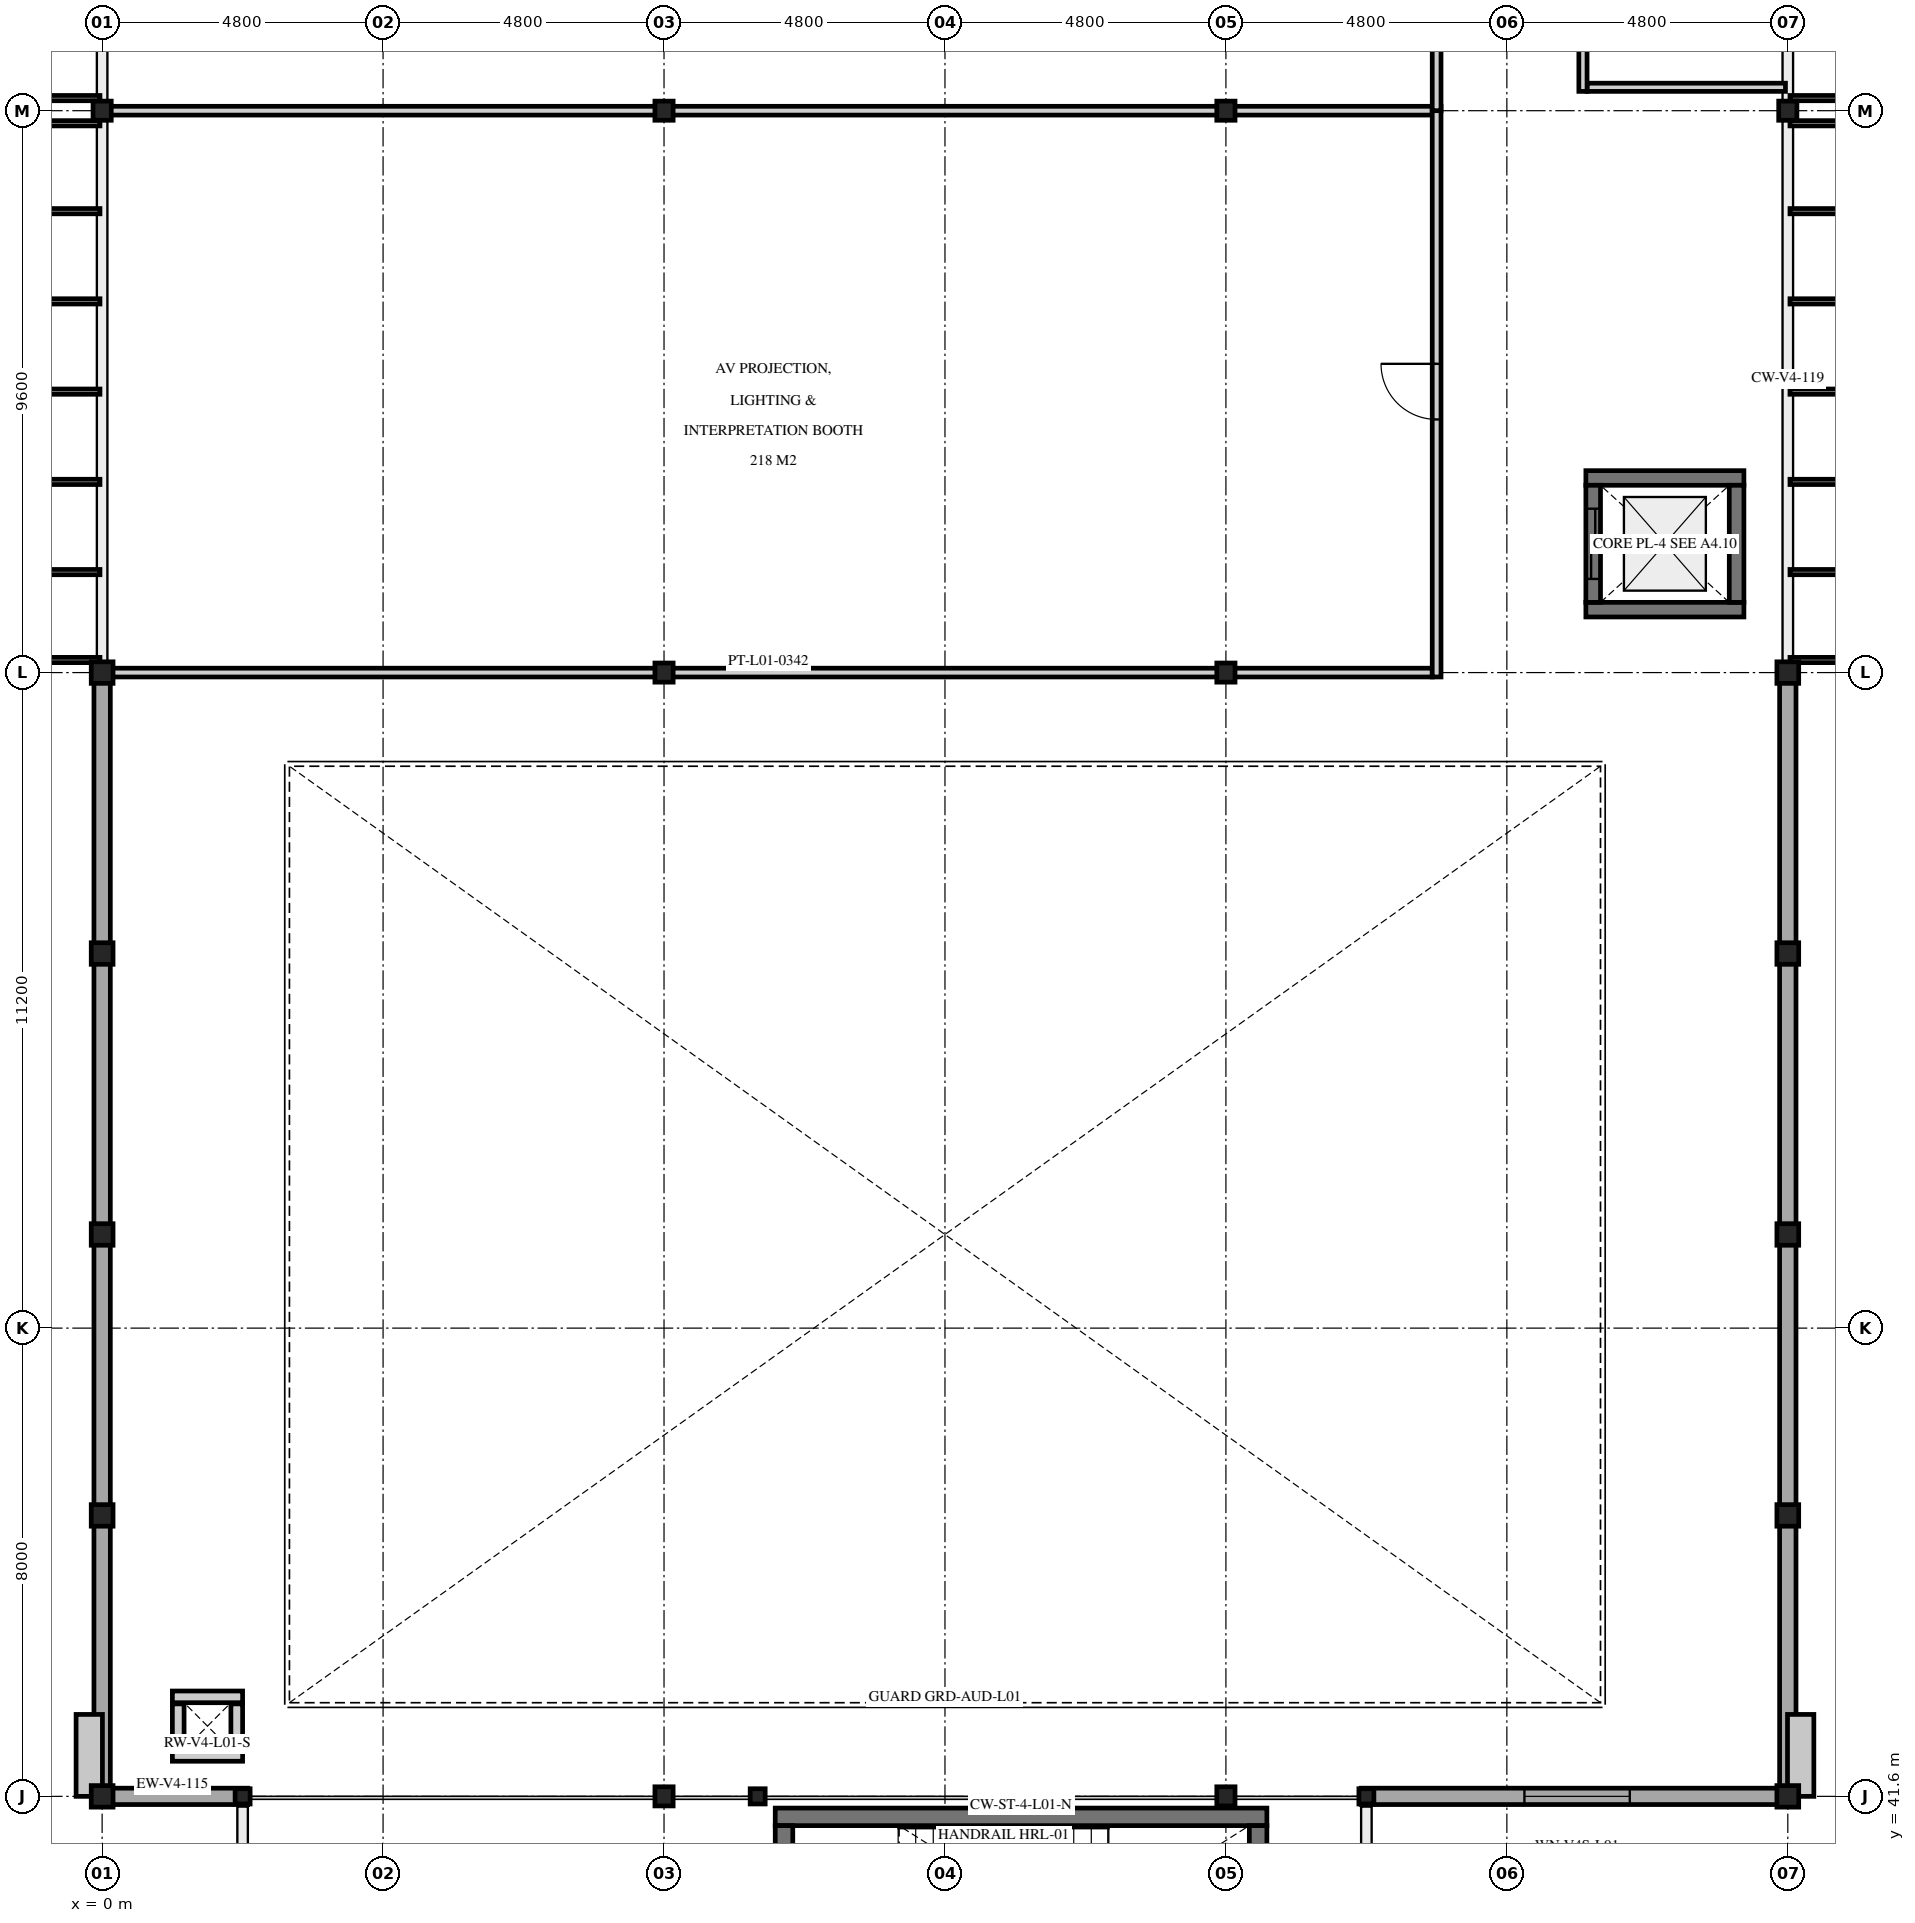
"""IFC4 building model, lengths in metres.
Left out: names, types, materials, properties, quantities, classifications, styles, units other than length and angle.
Written with IfcOpenShell. Run it as: python <this file> out.ifc"""

import sys

from ifc_helpers import new_model, si_unit, direction, frame, frame_2d, origin, origin_2d, place, context, subcontext, project, spatial, rectangle, i_section, extrude, element, fill, save


model = new_model("IFC4")
c1 = context("Model", 3, precision=1e-05, world=origin(), true_north=direction((0.0, 1.0)))
c2 = subcontext(c1, "Body", "Model", "MODEL_VIEW")
j1 = project(units=[si_unit("LENGTHUNIT", "METRE"), si_unit("PLANEANGLEUNIT", "RADIAN")], contexts=[c1])
p1 = place(None, origin())
s1 = spatial("IfcSite", under=j1, at=p1, CompositionType="ELEMENT")
p2 = place(p1, origin())
s2 = spatial("IfcBuilding", under=s1, at=p2, CompositionType="ELEMENT")
p3 = place(p2, frame((0.0, 0.0, 5.1)))
s3 = spatial("IfcBuildingStorey", under=s2, at=p3, CompositionType="ELEMENT", Elevation=5.1)
for number, where, z_axis, x_axis in (
    (1, (0.0, 41.6, 0.0), (0.0, 0.0, 1.0), (1.0, 0.0, 0.0)),
    (2, (0.0, 46.4, 0.0), (0.0, 0.0, 1.0), (1.0, 0.0, 0.0)),
    (3, (0.0, 51.2, 0.0), (0.0, 0.0, 1.0), (1.0, 0.0, 0.0)),
    (4, (0.0, 56.0, 0.0), (0.0, 0.0, 1.0), (1.0, 0.0, 0.0)),
    (5, (0.0, 60.8, 0.0), (0.0, 0.0, 1.0), (1.0, 0.0, 0.0)),
    (6, (28.8, 41.6, 0.0), (0.0, 0.0, 1.0), (1.0, 0.0, 0.0)),
    (7, (28.8, 46.4, 0.0), (0.0, 0.0, 1.0), (1.0, 0.0, 0.0)),
    (8, (28.8, 51.2, 0.0), (0.0, 0.0, 1.0), (1.0, 0.0, 0.0)),
    (9, (28.8, 56.0, 0.0), (0.0, 0.0, 1.0), (1.0, 0.0, 0.0)),
    (10, (28.8, 60.8, 0.0), (0.0, 0.0, 1.0), (1.0, 0.0, 0.0)),
):
    element("IfcColumn", number, at=place(p3, frame(where, z_axis=z_axis, x_axis=x_axis)), inside=s3, PredefinedType="COLUMN", context=c2, shape_type="SweptSolid", body=[
        extrude(i_section(OverallWidth=0.373, OverallDepth=0.368, WebThickness=0.014, FlangeThickness=0.024, at=origin_2d()), origin(), (0.0, 0.0, 1.0), 4.5),
    ])
for number, where, z_axis, x_axis in (
    (11, (9.6, 41.6, 0.0), (0.0, 0.0, 1.0), (1.0, 0.0, 0.0)),
    (12, (9.6, 60.8, 0.0), (0.0, 0.0, 1.0), (1.0, 0.0, 0.0)),
    (13, (19.2, 41.6, 0.0), (0.0, 0.0, 1.0), (1.0, 0.0, 0.0)),
    (14, (19.2, 60.8, 0.0), (0.0, 0.0, 1.0), (1.0, 0.0, 0.0)),
    (15, (0.0, 70.4, 0.0), (0.0, 0.0, 1.0), (1.0, 0.0, 0.0)),
    (16, (9.6, 70.4, 0.0), (0.0, 0.0, 1.0), (1.0, 0.0, 0.0)),
    (17, (19.2, 70.4, 0.0), (0.0, 0.0, 1.0), (1.0, 0.0, 0.0)),
    (18, (28.8, 70.4, 0.0), (0.0, 0.0, 1.0), (1.0, 0.0, 0.0)),
):
    element("IfcColumn", number, at=place(p3, frame(where, z_axis=z_axis, x_axis=x_axis)), inside=s3, PredefinedType="COLUMN", context=c2, shape_type="SweptSolid", body=[
        extrude(i_section(OverallWidth=0.311, OverallDepth=0.327, WebThickness=0.016, FlangeThickness=0.025, at=origin_2d()), origin(), (0.0, 0.0, 1.0), 4.5),
    ])
for number, where, z_axis, x_axis in (
    (19, (2.4, 41.6, 0.0), (0.0, 0.0, 1.0), (1.0, 0.0, 0.0)),
    (20, (11.2, 41.6, 0.0), (0.0, 0.0, 1.0), (1.0, 0.0, 0.0)),
    (21, (21.6, 41.6, 0.0), (0.0, 0.0, 1.0), (1.0, 0.0, 0.0)),
):
    element("IfcColumn", number, at=place(p3, frame(where, z_axis=z_axis, x_axis=x_axis)), inside=s3, PredefinedType="COLUMN", context=c2, shape_type="SweptSolid", body=[
        extrude(i_section(OverallWidth=0.256, OverallDepth=0.26, WebThickness=0.01, FlangeThickness=0.017, at=origin_2d()), origin(), (0.0, 0.0, 1.0), 4.5),
    ])
p4 = place(p3, frame((11.5, 41.25, 0.0), z_axis=(0.0, 0.0, 1.0), x_axis=(1.0, 0.0, 0.0)))
e22 = element("IfcWall", 22, at=p4, inside=s3, PredefinedType="SHEAR", context=c2, shape_type="SweptSolid", body=[
    extrude(rectangle(XDim=8.4, YDim=0.3, at=frame_2d((4.2, 0.0))), origin(), (0.0, 0.0, 1.0), 4.29),
])
p5 = place(p3, frame((11.65, 37.3, 0.0), z_axis=(0.0, 0.0, 1.0), x_axis=(0.0, 1.0, 0.0)))
e23 = element("IfcWall", 23, at=p5, inside=s3, PredefinedType="SHEAR", context=c2, shape_type="SweptSolid", body=[
    extrude(rectangle(XDim=3.8, YDim=0.3, at=frame_2d((1.9, 0.0))), origin(), (0.0, 0.0, 1.0), 4.29),
])
p6 = place(p5, frame((1.35, 0.0, 0.0)))
e24 = element("IfcOpeningElement", 24, at=p6, cuts=e23, PredefinedType="OPENING", context=c2, shape_type="SweptSolid", body=[
    extrude(rectangle(XDim=1.1, YDim=2.2, at=frame_2d((0.55, 1.1))), frame((0.0, 0.16, 0.0), z_axis=(0.0, -1.0, 0.0), x_axis=(1.0, 0.0, 0.0)), (0.0, 0.0, 1.0), 0.32),
])
p7 = place(p3, frame((19.75, 41.1, 0.0), z_axis=(0.0, 0.0, 1.0), x_axis=(0.0, -1.0, 0.0)))
e25 = element("IfcWall", 25, at=p7, inside=s3, PredefinedType="SHEAR", context=c2, shape_type="SweptSolid", body=[
    extrude(rectangle(XDim=3.8, YDim=0.3, at=frame_2d((1.9, 0.0))), origin(), (0.0, 0.0, 1.0), 4.29),
])
for number, where, z_axis, x_axis in (
    (26, (28.05, 61.875, 0.0), (0.0, 0.0, 1.0), (-1.0, 0.0, 0.0)),
    (27, (25.35, 64.125, 0.0), (0.0, 0.0, 1.0), (1.0, 0.0, 0.0)),
):
    element("IfcWall", number, at=place(p3, frame(where, z_axis=z_axis, x_axis=x_axis)), inside=s3, PredefinedType="SHEAR", context=c2, shape_type="SweptSolid", body=[
        extrude(rectangle(XDim=2.7, YDim=0.25, at=frame_2d((1.35, 0.0))), origin(), (0.0, 0.0, 1.0), 4.29),
    ])
p8 = place(p3, frame((25.475, 62.0, 0.0), z_axis=(0.0, 0.0, 1.0), x_axis=(0.0, 1.0, 0.0)))
e28 = element("IfcWall", 28, at=p8, inside=s3, PredefinedType="SHEAR", context=c2, shape_type="SweptSolid", body=[
    extrude(rectangle(XDim=2.0, YDim=0.25, at=frame_2d((1.0, 0.0))), origin(), (0.0, 0.0, 1.0), 4.29),
])
p9 = place(p8, frame((0.4, 0.0, 0.0)))
e29 = element("IfcOpeningElement", 29, at=p9, cuts=e28, PredefinedType="OPENING", context=c2, shape_type="SweptSolid", body=[
    extrude(rectangle(XDim=1.2, YDim=2.2, at=frame_2d((0.6, 1.1))), frame((0.0, 0.135, 0.0), z_axis=(0.0, -1.0, 0.0), x_axis=(1.0, 0.0, 0.0)), (0.0, 0.0, 1.0), 0.27),
])
p10 = place(p3, frame((27.925, 64.0, 0.0), z_axis=(0.0, 0.0, 1.0), x_axis=(0.0, -1.0, 0.0)))
e30 = element("IfcWall", 30, at=p10, inside=s3, PredefinedType="SHEAR", context=c2, shape_type="SweptSolid", body=[
    extrude(rectangle(XDim=2.0, YDim=0.25, at=frame_2d((1.0, 0.0))), origin(), (0.0, 0.0, 1.0), 4.29),
])
for number, where, z_axis, x_axis in (
    (31, (2.4, 42.3, 0.0), (0.0, 0.0, 1.0), (-1.0, 0.0, 0.0)),
    (32, (1.2, 43.3, 0.0), (0.0, 0.0, 1.0), (1.0, 0.0, 0.0)),
):
    element("IfcWall", number, at=place(p3, frame(where, z_axis=z_axis, x_axis=x_axis)), inside=s3, PredefinedType="PARTITIONING", context=c2, shape_type="SweptSolid", body=[
        extrude(rectangle(XDim=1.2, YDim=0.2, at=frame_2d((0.6, 0.0))), origin(), (0.0, 0.0, 1.0), 3.79),
    ])
for number, where, z_axis, x_axis in (
    (33, (1.3, 42.42, 0.0), (0.0, 0.0, 1.0), (0.0, 1.0, 0.0)),
    (34, (2.3, 43.18, 0.0), (0.0, 0.0, 1.0), (0.0, -1.0, 0.0)),
):
    element("IfcWall", number, at=place(p3, frame(where, z_axis=z_axis, x_axis=x_axis)), inside=s3, PredefinedType="PARTITIONING", context=c2, shape_type="SweptSolid", body=[
        extrude(rectangle(XDim=0.76, YDim=0.2, at=frame_2d((0.38, 0.0))), origin(), (0.0, 0.0, 1.0), 3.79),
    ])
p11 = place(p3, frame((2.485, 41.6, 0.0), z_axis=(0.0, 0.0, 1.0), x_axis=(-1.0, 0.0, 0.0)))
e35 = element("IfcWall", 35, at=p11, inside=s3, PredefinedType="SOLIDWALL", context=c2, shape_type="SweptSolid", body=[
    extrude(rectangle(XDim=2.57, YDim=0.28, at=frame_2d((1.285, 0.0))), origin(), (0.0, 0.0, 1.0), 3.732),
])
p12 = place(p3, frame((28.885, 41.6, 0.0), z_axis=(0.0, 0.0, 1.0), x_axis=(-1.0, 0.0, 0.0)))
e36 = element("IfcWall", 36, at=p12, inside=s3, PredefinedType="SOLIDWALL", context=c2, shape_type="SweptSolid", body=[
    extrude(rectangle(XDim=7.37, YDim=0.28, at=frame_2d((3.685, 0.0))), origin(), (0.0, 0.0, 1.0), 3.732),
])
p13 = place(p12, frame((2.785, 0.0, 1.0)))
e37 = element("IfcOpeningElement", 37, at=p13, cuts=e36, PredefinedType="OPENING", context=c2, shape_type="SweptSolid", body=[
    extrude(rectangle(XDim=1.8, YDim=2.1, at=frame_2d((0.9, 1.05))), frame((0.0, 0.15, 0.0), z_axis=(0.0, -1.0, 0.0), x_axis=(1.0, 0.0, 0.0)), (0.0, 0.0, 1.0), 0.3),
])
for number, where, z_axis, x_axis in (
    (38, (0.0, 41.515, 0.0), (0.0, 0.0, 1.0), (0.0, 1.0, 0.0)),
    (39, (28.8, 46.485, 0.0), (0.0, 0.0, 1.0), (0.0, -1.0, 0.0)),
):
    element("IfcWall", number, at=place(p3, frame(where, z_axis=z_axis, x_axis=x_axis)), inside=s3, PredefinedType="SOLIDWALL", context=c2, shape_type="SweptSolid", body=[
        extrude(rectangle(XDim=4.97, YDim=0.28, at=frame_2d((2.485, 0.0))), origin(), (0.0, 0.0, 1.0), 3.665),
    ])
for number, where, z_axis, x_axis in (
    (40, (0.0, 46.315, 0.0), (0.0, 0.0, 1.0), (0.0, 1.0, 0.0)),
    (41, (28.8, 51.285, 0.0), (0.0, 0.0, 1.0), (0.0, -1.0, 0.0)),
    (42, (0.0, 51.115, 0.0), (0.0, 0.0, 1.0), (0.0, 1.0, 0.0)),
    (43, (28.8, 56.085, 0.0), (0.0, 0.0, 1.0), (0.0, -1.0, 0.0)),
    (44, (0.0, 55.915, 0.0), (0.0, 0.0, 1.0), (0.0, 1.0, 0.0)),
    (45, (28.8, 60.885, 0.0), (0.0, 0.0, 1.0), (0.0, -1.0, 0.0)),
):
    element("IfcWall", number, at=place(p3, frame(where, z_axis=z_axis, x_axis=x_axis)), inside=s3, PredefinedType="SOLIDWALL", context=c2, shape_type="SweptSolid", body=[
        extrude(rectangle(XDim=4.97, YDim=0.28, at=frame_2d((2.485, 0.0))), origin(), (0.0, 0.0, 1.0), 3.665),
    ])
p14 = place(p3, frame((25.37, 70.8, 0.0), z_axis=(0.0, 0.0, 1.0), x_axis=(1.0, 0.0, 0.0)))
e46 = element("IfcWall", 46, at=p14, inside=s3, PredefinedType="PARTITIONING", context=c2, shape_type="SweptSolid", body=[
    extrude(rectangle(XDim=3.39, YDim=0.14, at=frame_2d((1.695, 0.0))), origin(), (0.0, 0.0, 1.0), 3.812),
])
p15 = place(p3, frame((25.3, 70.73, 0.0), z_axis=(0.0, 0.0, 1.0), x_axis=(0.0, 1.0, 0.0)))
e47 = element("IfcWall", 47, at=p15, inside=s3, PredefinedType="PARTITIONING", context=c2, shape_type="SweptSolid", body=[
    extrude(rectangle(XDim=5.54, YDim=0.14, at=frame_2d((2.77, 0.0))), origin(), (0.0, 0.0, 1.0), 3.905),
])
p16 = place(p15, frame((2.295, 0.0, 0.0)))
e48 = element("IfcOpeningElement", 48, at=p16, cuts=e47, PredefinedType="OPENING", context=c2, shape_type="SweptSolid", body=[
    extrude(rectangle(XDim=0.95, YDim=2.1, at=frame_2d((0.475, 1.05))), frame((0.0, 0.08, 0.0), z_axis=(0.0, -1.0, 0.0), x_axis=(1.0, 0.0, 0.0)), (0.0, 0.0, 1.0), 0.16),
])
p17 = place(p3, frame((0.04, 60.8, 0.0), z_axis=(0.0, 0.0, 1.0), x_axis=(1.0, 0.0, 0.0)))
e49 = element("IfcWall", 49, at=p17, inside=s3, PredefinedType="PARTITIONING", context=c2, shape_type="SweptSolid", body=[
    extrude(rectangle(XDim=22.685, YDim=0.15, at=frame_2d((11.343, 0.0))), origin(), (0.0, 0.0, 1.0), 3.732),
])
p18 = place(p3, frame((0.04, 70.4, 0.0), z_axis=(0.0, 0.0, 1.0), x_axis=(1.0, 0.0, 0.0)))
e50 = element("IfcWall", 50, at=p18, inside=s3, PredefinedType="PARTITIONING", context=c2, shape_type="SweptSolid", body=[
    extrude(rectangle(XDim=22.685, YDim=0.15, at=frame_2d((11.343, 0.0))), origin(), (0.0, 0.0, 1.0), 3.765),
])
p19 = place(p3, frame((22.8, 60.725, 0.0), z_axis=(0.0, 0.0, 1.0), x_axis=(0.0, 1.0, 0.0)))
e51 = element("IfcWall", 51, at=p19, inside=s3, PredefinedType="PARTITIONING", context=c2, shape_type="SweptSolid", body=[
    extrude(rectangle(XDim=9.75, YDim=0.15, at=frame_2d((4.875, 0.0))), origin(), (0.0, 0.0, 1.0), 3.765),
])
p20 = place(p19, frame((4.4, 0.0, 0.0)))
e52 = element("IfcOpeningElement", 52, at=p20, cuts=e51, PredefinedType="OPENING", context=c2, shape_type="SweptSolid", body=[
    extrude(rectangle(XDim=0.95, YDim=2.15, at=frame_2d((0.475, 1.075))), frame((0.0, 0.085, 0.0), z_axis=(0.0, -1.0, 0.0), x_axis=(1.0, 0.0, 0.0)), (0.0, 0.0, 1.0), 0.17),
])
p21 = place(p3, frame((22.8, 70.4, 0.0), z_axis=(0.0, 0.0, 1.0), x_axis=(0.0, 1.0, 0.0)))
e53 = element("IfcWall", 53, at=p21, inside=s3, PredefinedType="PARTITIONING", context=c2, shape_type="SweptSolid", body=[
    extrude(rectangle(XDim=19.275, YDim=0.15, at=frame_2d((9.638, 0.0))), origin(), (0.0, 0.0, 1.0), 3.765),
])
p22 = place(p21, frame((9.162, 0.0, 0.0)))
e54 = element("IfcOpeningElement", 54, at=p22, cuts=e53, PredefinedType="OPENING", context=c2, shape_type="SweptSolid", body=[
    extrude(rectangle(XDim=0.95, YDim=2.15, at=frame_2d((0.475, 1.075))), frame((0.0, 0.085, 0.0), z_axis=(0.0, -1.0, 0.0), x_axis=(1.0, 0.0, 0.0)), (0.0, 0.0, 1.0), 0.17),
])
p23 = place(p9, origin())
e55 = element("IfcDoor", 55, at=p23, inside=s3, OperationType="DOUBLE_DOOR_SLIDING", PredefinedType="DOOR", context=c2, shape_type="SweptSolid", body=[
    extrude(rectangle(XDim=1.2, YDim=2.2, at=frame_2d((0.6, 1.1))), frame((0.0, 0.025, 0.0), z_axis=(0.0, -1.0, 0.0), x_axis=(1.0, 0.0, 0.0)), (0.0, 0.0, 1.0), 0.05),
])
fill(e29, e55)
p24 = place(p13, origin())
e56 = element("IfcWindow", 56, at=p24, inside=s3, PartitioningType="SINGLE_PANEL", PredefinedType="WINDOW", context=c2, shape_type="SweptSolid", body=[
    extrude(rectangle(XDim=1.8, YDim=2.1, at=frame_2d((0.9, 1.05))), frame((0.0, 0.03, 0.0), z_axis=(0.0, -1.0, 0.0), x_axis=(1.0, 0.0, 0.0)), (0.0, 0.0, 1.0), 0.06),
])
fill(e37, e56)
p25 = place(p20, origin())
e57 = element("IfcDoor", 57, at=p25, inside=s3, OperationType="SINGLE_SWING_RIGHT", PredefinedType="DOOR", context=c2, shape_type="SweptSolid", body=[
    extrude(rectangle(XDim=0.95, YDim=2.15, at=frame_2d((0.475, 1.075))), frame((0.0, 0.025, 0.0), z_axis=(0.0, -1.0, 0.0), x_axis=(1.0, 0.0, 0.0)), (0.0, 0.0, 1.0), 0.05),
])
fill(e52, e57)
save(model, sys.argv[1])
